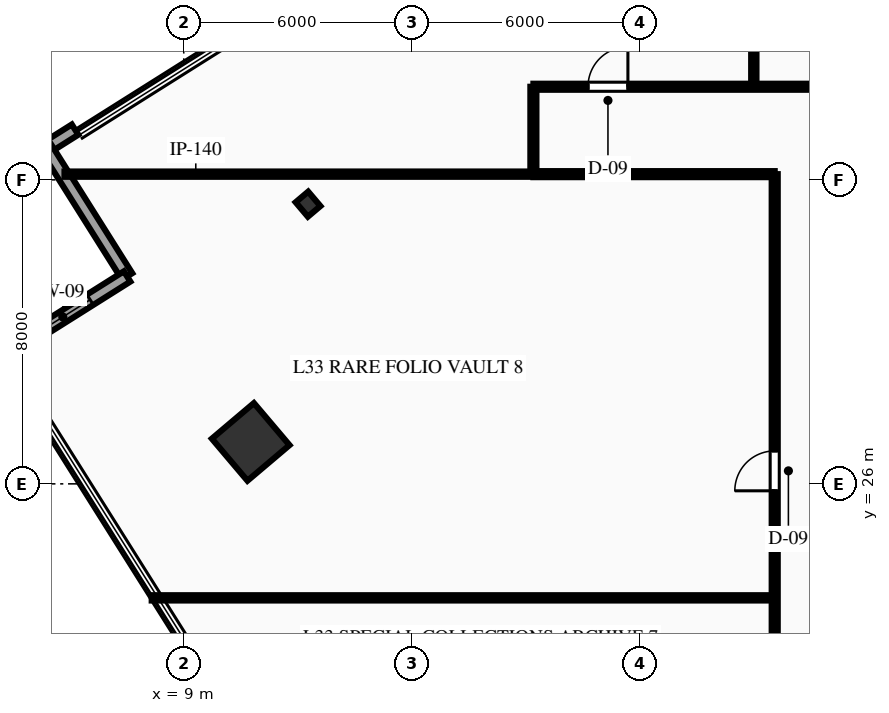
"""IFC4 building model, lengths in metres.
Left out: names, types, materials, properties, quantities, classifications, styles, units other than length and angle.
Written with IfcOpenShell. Run it as: python <this file> out.ifc"""

import sys

from ifc_helpers import new_model, si_unit, direction, frame, frame_2d, origin, origin_2d, place, context, subcontext, project, spatial, rectangle, hollow_rectangle, i_section, extrude, element, fill, save


model = new_model("IFC4")
c1 = context("Model", 3, precision=1e-05, world=origin(), true_north=direction((0.0, 1.0)))
c2 = subcontext(c1, "Body", "Model", "MODEL_VIEW")
j1 = project(units=[si_unit("LENGTHUNIT", "METRE"), si_unit("PLANEANGLEUNIT", "RADIAN")], contexts=[c1])
p1 = place(None, origin())
s1 = spatial("IfcSite", under=j1, at=p1, CompositionType="ELEMENT")
p2 = place(p1, origin())
s2 = spatial("IfcBuilding", under=s1, at=p2, CompositionType="ELEMENT")
p3 = place(p2, frame((0.0, 0.0, 136.2)))
s3 = spatial("IfcBuildingStorey", under=s2, at=p3, CompositionType="ELEMENT", Elevation=136.2)
p4 = place(p3, frame((10.761, 27.104, 0.0), z_axis=(0.0, 0.0, 1.0), x_axis=(0.763232469783, 0.646123979643, 0.0)))
e1 = element("IfcColumn", 1, at=p4, inside=s3, PredefinedType="COLUMN", context=c2, shape_type="SweptSolid", body=[
    extrude(hollow_rectangle(XDim=1.45, YDim=1.45, WallThickness=0.07, at=origin_2d()), origin(), (0.0, 0.0, 1.0), 4.5),
])
p5 = place(p3, frame((12.27, 33.36, 0.0), z_axis=(0.0, 0.0, 1.0), x_axis=(0.763232469783, 0.646123979643, 0.0)))
e2 = element("IfcColumn", 2, at=p5, inside=s3, PredefinedType="COLUMN", context=c2, shape_type="SweptSolid", body=[
    extrude(i_section(OverallWidth=0.432, OverallDepth=0.498, WebThickness=0.056, FlangeThickness=0.089, at=origin_2d()), origin(), (0.0, 0.0, 1.0), 4.5),
])
p6 = place(p3, frame((5.378, 34.842, 0.0), z_axis=(0.0, 0.0, 1.0), x_axis=(0.846164898331, 0.53292116193, 0.0)))
e3 = element("IfcWall", 3, at=p6, inside=s3, PredefinedType="STANDARD", context=c2, shape_type="SweptSolid", body=[
    extrude(rectangle(XDim=0.9, YDim=0.32, at=frame_2d((0.45, 0.0))), origin(), (0.0, 0.0, 1.0), 4.21),
])
p7 = place(p3, frame((7.51, 31.458, 0.0), z_axis=(0.0, 0.0, 1.0), x_axis=(-0.532892588268, 0.846182893569, 0.0)))
e4 = element("IfcWall", 4, at=p7, inside=s3, PredefinedType="STANDARD", context=c2, shape_type="SweptSolid", body=[
    extrude(rectangle(XDim=4.0, YDim=0.32, at=frame_2d((2.0, 0.0))), origin(), (0.0, 0.0, 1.0), 4.21),
])
p8 = place(p3, frame((4.125, 29.326, 0.0), z_axis=(0.0, 0.0, 1.0), x_axis=(0.846210415312, 0.532848883848, 0.0)))
e5 = element("IfcWall", 5, at=p8, inside=s3, PredefinedType="STANDARD", context=c2, shape_type="SweptSolid", body=[
    extrude(rectangle(XDim=4.0, YDim=0.32, at=frame_2d((2.0, 0.0))), origin(), (0.0, 0.0, 1.0), 4.21),
])
p9 = place(p8, frame((1.15, 0.0, 0.75)))
e6 = element("IfcOpeningElement", 6, at=p9, cuts=e5, PredefinedType="OPENING", context=c2, shape_type="SweptSolid", body=[
    extrude(rectangle(XDim=1.7, YDim=2.5, at=frame_2d((0.85, 1.25))), frame((0.0, 0.17, 0.0), z_axis=(0.0, -1.0, 0.0), x_axis=(1.0, 0.0, 0.0)), (0.0, 0.0, 1.0), 0.34),
])
p10 = place(p3, frame((18.2, 36.45, 0.0), z_axis=(0.0, 0.0, 1.0), x_axis=(1.0, 0.0, 0.0)))
e7 = element("IfcWall", 7, at=p10, inside=s3, PredefinedType="PARTITIONING", context=c2, shape_type="SweptSolid", body=[
    extrude(rectangle(XDim=35.6, YDim=0.16, at=frame_2d((17.8, 0.0))), origin(), (0.0, 0.0, 1.0), 4.21),
])
p11 = place(p10, frame((1.437, 0.0, 0.0)))
e8 = element("IfcOpeningElement", 8, at=p11, cuts=e7, PredefinedType="OPENING", context=c2, shape_type="SweptSolid", body=[
    extrude(rectangle(XDim=1.05, YDim=2.15, at=frame_2d((0.525, 1.075))), frame((0.0, 0.09, 0.0), z_axis=(0.0, -1.0, 0.0), x_axis=(1.0, 0.0, 0.0)), (0.0, 0.0, 1.0), 0.18),
])
p12 = place(p10, frame((12.535, 0.0, 0.0)))
e9 = element("IfcOpeningElement", 9, at=p12, cuts=e7, PredefinedType="OPENING", context=c2, shape_type="SweptSolid", body=[
    extrude(rectangle(XDim=1.05, YDim=2.15, at=frame_2d((0.525, 1.075))), frame((0.0, 0.09, 0.0), z_axis=(0.0, -1.0, 0.0), x_axis=(1.0, 0.0, 0.0)), (0.0, 0.0, 1.0), 0.18),
])
p13 = place(p10, frame((19.175, 0.0, 0.0)))
e10 = element("IfcOpeningElement", 10, at=p13, cuts=e7, PredefinedType="OPENING", context=c2, shape_type="SweptSolid", body=[
    extrude(rectangle(XDim=1.05, YDim=2.15, at=frame_2d((0.525, 1.075))), frame((0.0, 0.09, 0.0), z_axis=(0.0, -1.0, 0.0), x_axis=(1.0, 0.0, 0.0)), (0.0, 0.0, 1.0), 0.18),
])
p14 = place(p10, frame((29.205, 0.0, 0.0)))
e11 = element("IfcOpeningElement", 11, at=p14, cuts=e7, PredefinedType="OPENING", context=c2, shape_type="SweptSolid", body=[
    extrude(rectangle(XDim=1.05, YDim=2.15, at=frame_2d((0.525, 1.075))), frame((0.0, 0.09, 0.0), z_axis=(0.0, -1.0, 0.0), x_axis=(1.0, 0.0, 0.0)), (0.0, 0.0, 1.0), 0.18),
])
p15 = place(p3, frame((18.2, 34.15, 0.0), z_axis=(0.0, 0.0, 1.0), x_axis=(1.0, 0.0, 0.0)))
e12 = element("IfcWall", 12, at=p15, inside=s3, PredefinedType="PARTITIONING", context=c2, shape_type="SweptSolid", body=[
    extrude(rectangle(XDim=6.35, YDim=0.16, at=frame_2d((3.175, 0.0))), origin(), (0.0, 0.0, 1.0), 4.21),
])
p16 = place(p3, frame((24.55, 17.85, 0.0), z_axis=(0.0, 0.0, 1.0), x_axis=(0.0, 1.0, 0.0)))
e13 = element("IfcWall", 13, at=p16, inside=s3, PredefinedType="PARTITIONING", context=c2, shape_type="SweptSolid", body=[
    extrude(rectangle(XDim=16.3, YDim=0.16, at=frame_2d((8.15, 0.0))), origin(), (0.0, 0.0, 1.0), 4.21),
])
p17 = place(p16, frame((7.967, 0.0, 0.0)))
e14 = element("IfcOpeningElement", 14, at=p17, cuts=e13, PredefinedType="OPENING", context=c2, shape_type="SweptSolid", body=[
    extrude(rectangle(XDim=1.05, YDim=2.15, at=frame_2d((0.525, 1.075))), frame((0.0, 0.09, 0.0), z_axis=(0.0, -1.0, 0.0), x_axis=(1.0, 0.0, 0.0)), (0.0, 0.0, 1.0), 0.18),
])
p18 = place(p3, frame((18.2, 34.15, 0.0), z_axis=(0.0, 0.0, 1.0), x_axis=(0.0, 1.0, 0.0)))
e15 = element("IfcWall", 15, at=p18, inside=s3, PredefinedType="PARTITIONING", context=c2, shape_type="SweptSolid", body=[
    extrude(rectangle(XDim=2.3, YDim=0.16, at=frame_2d((1.15, 0.0))), origin(), (0.0, 0.0, 1.0), 4.21),
])
p19 = place(p3, frame((5.862, 34.15, 0.0), z_axis=(0.0, 0.0, 1.0), x_axis=(1.0, 0.0, 0.0)))
e16 = element("IfcWall", 16, at=p19, inside=s3, PredefinedType="PARTITIONING", context=c2, shape_type="SweptSolid", body=[
    extrude(rectangle(XDim=12.338, YDim=0.14, at=frame_2d((6.169, 0.0))), origin(), (0.0, 0.0, 1.0), 4.21),
])
p20 = place(p3, frame((24.0, 36.45, 0.0), z_axis=(0.0, 0.0, 1.0), x_axis=(0.0, 1.0, 0.0)))
e17 = element("IfcWall", 17, at=p20, inside=s3, PredefinedType="PARTITIONING", context=c2, shape_type="SweptSolid", body=[
    extrude(rectangle(XDim=10.072, YDim=0.14, at=frame_2d((5.036, 0.0))), origin(), (0.0, 0.0, 1.0), 4.21),
])
p21 = place(p3, frame((8.156, 23.0, 0.0), z_axis=(0.0, 0.0, 1.0), x_axis=(1.0, 0.0, 0.0)))
e18 = element("IfcWall", 18, at=p21, inside=s3, PredefinedType="PARTITIONING", context=c2, shape_type="SweptSolid", body=[
    extrude(rectangle(XDim=16.394, YDim=0.14, at=frame_2d((8.197, 0.0))), origin(), (0.0, 0.0, 1.0), 4.21),
])
p22 = place(p9, origin())
e19 = element("IfcWindow", 19, at=p22, inside=s3, PartitioningType="SINGLE_PANEL", PredefinedType="WINDOW", context=c2, shape_type="SweptSolid", body=[
    extrude(rectangle(XDim=1.7, YDim=2.5, at=frame_2d((0.85, 1.25))), frame((0.0, 0.03, 0.0), z_axis=(0.0, -1.0, 0.0), x_axis=(1.0, 0.0, 0.0)), (0.0, 0.0, 1.0), 0.06),
])
fill(e6, e19)
p23 = place(p11, origin())
e20 = element("IfcDoor", 20, at=p23, inside=s3, OperationType="SINGLE_SWING_RIGHT", PredefinedType="DOOR", context=c2, shape_type="SweptSolid", body=[
    extrude(rectangle(XDim=1.05, YDim=2.15, at=frame_2d((0.525, 1.075))), frame((0.0, 0.025, 0.0), z_axis=(0.0, -1.0, 0.0), x_axis=(1.0, 0.0, 0.0)), (0.0, 0.0, 1.0), 0.05),
])
fill(e8, e20)
p24 = place(p17, origin())
e21 = element("IfcDoor", 21, at=p24, inside=s3, OperationType="SINGLE_SWING_LEFT", PredefinedType="DOOR", context=c2, shape_type="SweptSolid", body=[
    extrude(rectangle(XDim=1.05, YDim=2.15, at=frame_2d((0.525, 1.075))), frame((0.0, 0.025, 0.0), z_axis=(0.0, -1.0, 0.0), x_axis=(1.0, 0.0, 0.0)), (0.0, 0.0, 1.0), 0.05),
])
fill(e14, e21)
save(model, sys.argv[1])
